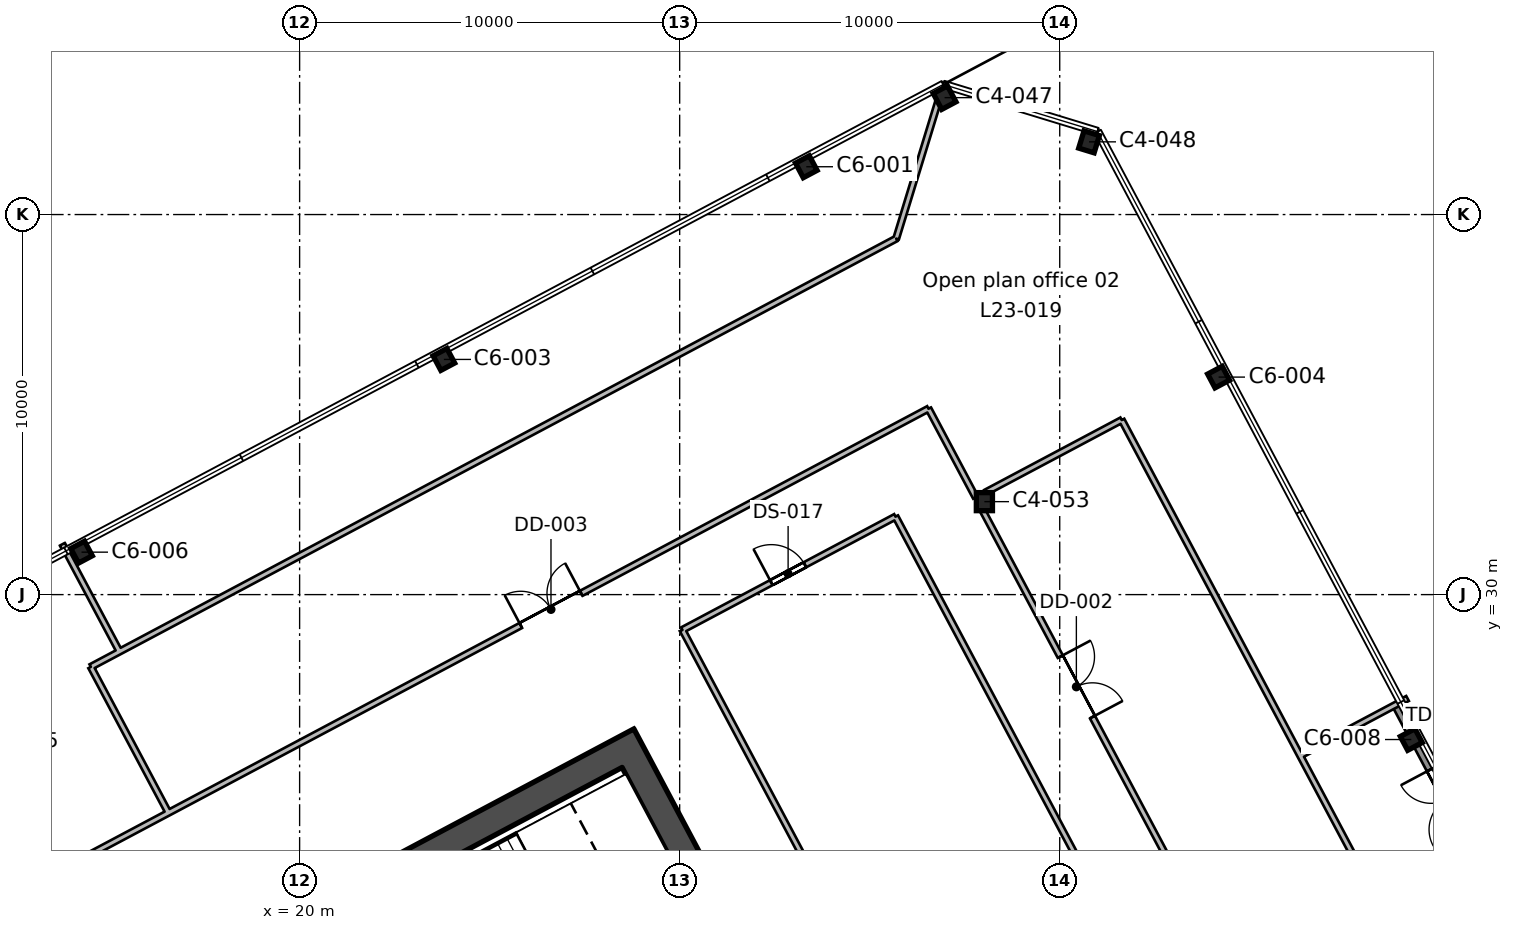
"""IFC4 building model, lengths in metres.
Left out: names, types, materials, properties, quantities, classifications, styles, units other than length and angle.
Written with IfcOpenShell. Run it as: python <this file> out.ifc"""

import sys

from ifc_helpers import new_model, si_unit, direction, frame, frame_2d, origin, origin_2d, place, context, subcontext, project, spatial, rectangle, i_section, extrude, element, fill, save


model = new_model("IFC4")
c1 = context("Model", 3, precision=1e-05, world=origin(), true_north=direction((0.0, 1.0)))
c2 = subcontext(c1, "Body", "Model", "MODEL_VIEW")
j1 = project(units=[si_unit("LENGTHUNIT", "METRE"), si_unit("PLANEANGLEUNIT", "RADIAN")], contexts=[c1])
p1 = place(None, origin())
s1 = spatial("IfcSite", under=j1, at=p1, CompositionType="ELEMENT")
p2 = place(p1, origin())
s2 = spatial("IfcBuilding", under=s1, at=p2, CompositionType="ELEMENT")
p3 = place(p2, frame((0.0, 0.0, 118.2)))
s3 = spatial("IfcBuildingStorey", under=s2, at=p3, CompositionType="ELEMENT", Elevation=118.2)
for number, where, z_axis, x_axis in (
    (1, (49.251, 26.187, 0.0), (0.0, 0.0, 1.0), (-0.469, 0.883, 0.0)),
    (2, (14.261, 31.117, 0.0), (0.0, 0.0, 1.0), (-0.883, -0.469, 0.0)),
):
    element("IfcColumn", number, at=place(p3, frame(where, z_axis=z_axis, x_axis=x_axis)), inside=s3, PredefinedType="COLUMN", context=c2, shape_type="SweptSolid", body=[
        extrude(i_section(OverallWidth=0.412, OverallDepth=0.434, WebThickness=0.036, FlangeThickness=0.057, FilletRadius=0.015, at=origin_2d()), origin(), (0.0, 0.0, 1.0), 4.0),
    ])
p4 = place(p3, frame((38.018, 32.446, 0.0), z_axis=(0.0, 0.0, 1.0), x_axis=(1.0, 0.0, 0.0)))
e3 = element("IfcColumn", 3, at=p4, inside=s3, PredefinedType="COLUMN", context=c2, shape_type="SweptSolid", body=[
    extrude(i_section(OverallWidth=0.424, OverallDepth=0.475, WebThickness=0.048, FlangeThickness=0.077, FilletRadius=0.015, at=origin_2d()), origin(), (0.0, 0.0, 1.0), 4.0),
])
for number, where, z_axis, x_axis in (
    (4, (44.181, 35.723, 0.0), (0.0, 0.0, 1.0), (-0.469, 0.883, 0.0)),
    (5, (23.796, 36.188, 0.0), (0.0, 0.0, 1.0), (-0.883, -0.469, 0.0)),
    (6, (33.332, 41.258, 0.0), (0.0, 0.0, 1.0), (-0.883, -0.469, 0.0)),
):
    element("IfcColumn", number, at=place(p3, frame(where, z_axis=z_axis, x_axis=x_axis)), inside=s3, PredefinedType="COLUMN", context=c2, shape_type="SweptSolid", body=[
        extrude(i_section(OverallWidth=0.412, OverallDepth=0.434, WebThickness=0.036, FlangeThickness=0.057, FilletRadius=0.015, at=origin_2d()), origin(), (0.0, 0.0, 1.0), 4.0),
    ])
for number, where, z_axis, x_axis in (
    (7, (40.772, 41.913, 0.0), (0.0, 0.0, 1.0), (-0.956, 0.292, 0.0)),
    (8, (36.971, 43.076, 0.0), (0.0, 0.0, 1.0), (-0.883, -0.469, 0.0)),
):
    element("IfcColumn", number, at=place(p3, frame(where, z_axis=z_axis, x_axis=x_axis)), inside=s3, PredefinedType="COLUMN", context=c2, shape_type="SweptSolid", body=[
        extrude(i_section(OverallWidth=0.424, OverallDepth=0.475, WebThickness=0.048, FlangeThickness=0.077, FilletRadius=0.015, at=origin_2d()), origin(), (0.0, 0.0, 1.0), 4.0),
    ])
p5 = place(p3, frame((37.713, 8.896, 0.0), z_axis=(0.0, 0.0, 1.0), x_axis=(-0.469469918705, 0.88294846703, 0.0)))
e9 = element("IfcWall", 9, at=p5, inside=s3, PredefinedType="SHEAR", context=c2, shape_type="SweptSolid", body=[
    extrude(rectangle(XDim=19.7, YDim=0.75, at=frame_2d((9.85, 0.0))), origin(), (0.0, 0.0, 1.0), 4.0),
])
p6 = place(p5, frame((10.45, 0.0, 0.0)))
e10 = element("IfcOpeningElement", 10, at=p6, cuts=e9, PredefinedType="OPENING", context=c2, shape_type="SweptSolid", body=[
    extrude(rectangle(XDim=2.4, YDim=2.4, at=frame_2d((1.2, 1.2))), frame((0.0, 0.385, 0.0), z_axis=(0.0, -1.0, 0.0), x_axis=(1.0, 0.0, 0.0)), (0.0, 0.0, 1.0), 0.77),
])
p7 = place(p3, frame((10.474, 16.3, 0.0), z_axis=(0.0, 0.0, 1.0), x_axis=(0.88295010195, 0.469466843842, 0.0)))
e11 = element("IfcWall", 11, at=p7, inside=s3, PredefinedType="SHEAR", context=c2, shape_type="SweptSolid", body=[
    extrude(rectangle(XDim=20.2, YDim=0.75, at=frame_2d((10.1, 0.0))), origin(), (0.0, 0.0, 1.0), 4.0),
])
p8 = place(p3, frame((51.525, 22.111, 0.0), z_axis=(0.0, 0.0, 1.0), x_axis=(-0.469442908777, 0.88296282787, 0.0)))
e12 = element("IfcWall", 12, at=p8, inside=s3, PredefinedType="STANDARD", context=c2, shape_type="SweptSolid", body=[
    extrude(rectangle(XDim=5.667, YDim=0.25, at=frame_2d((2.833, 0.0))), origin(), (0.0, 0.0, 1.0), 2.619),
])
p9 = place(p8, frame((1.933, 0.0, 0.0)))
e13 = element("IfcOpeningElement", 13, at=p9, cuts=e12, PredefinedType="OPENING", context=c2, shape_type="SweptSolid", body=[
    extrude(rectangle(XDim=1.8, YDim=2.4, at=frame_2d((0.9, 1.2))), frame((0.0, 0.135, 0.0), z_axis=(0.0, -1.0, 0.0), x_axis=(1.0, 0.0, 0.0)), (0.0, 0.0, 1.0), 0.27),
])
p10 = place(p3, frame((0.0, 15.46, 0.0), z_axis=(0.0, 0.0, 1.0), x_axis=(0.882952116052, 0.469463055798, 0.0)))
e14 = element("IfcWall", 14, at=p10, inside=s3, PredefinedType="PARTITIONING", context=c2, shape_type="SweptSolid", body=[
    extrude(rectangle(XDim=18.96, YDim=0.15, at=frame_2d((9.48, 0.0))), origin(), (0.0, 0.0, 1.0), 3.64),
])
p11 = place(p10, frame((9.35, 0.0, 0.0)))
e15 = element("IfcOpeningElement", 15, at=p11, cuts=e14, PredefinedType="OPENING", context=c2, shape_type="SweptSolid", body=[
    extrude(rectangle(XDim=1.0, YDim=2.1, at=frame_2d((0.5, 1.05))), frame((0.0, 0.085, 0.0), z_axis=(0.0, -1.0, 0.0), x_axis=(1.0, 0.0, 0.0)), (0.0, 0.0, 1.0), 0.17),
])
p12 = place(p10, frame((7.7, 0.0, 0.0)))
e16 = element("IfcOpeningElement", 16, at=p12, cuts=e14, PredefinedType="OPENING", context=c2, shape_type="SweptSolid", body=[
    extrude(rectangle(XDim=1.0, YDim=2.1, at=frame_2d((0.5, 1.05))), frame((0.0, 0.085, 0.0), z_axis=(0.0, -1.0, 0.0), x_axis=(1.0, 0.0, 0.0)), (0.0, 0.0, 1.0), 0.17),
])
p13 = place(p3, frame((15.761, 25.739, 0.0), z_axis=(0.0, 0.0, 1.0), x_axis=(0.469318416257, -0.883029005278, 0.0)))
e17 = element("IfcWall", 17, at=p13, inside=s3, PredefinedType="PARTITIONING", context=c2, shape_type="SweptSolid", body=[
    extrude(rectangle(XDim=1.677, YDim=0.15, at=frame_2d((0.839, 0.0))), origin(), (0.0, 0.0, 1.0), 3.64),
])
p14 = place(p3, frame((13.757, 31.325, 0.0), z_axis=(0.0, 0.0, 1.0), x_axis=(0.469685095616, -0.882834022315, 0.0)))
e18 = element("IfcWall", 18, at=p14, inside=s3, PredefinedType="PARTITIONING", context=c2, shape_type="SweptSolid", body=[
    extrude(rectangle(XDim=3.2, YDim=0.15, at=frame_2d((1.6, 0.0))), origin(), (0.0, 0.0, 1.0), 3.64),
])
p15 = place(p3, frame((15.258, 28.499, 0.0), z_axis=(0.0, 0.0, 1.0), x_axis=(0.882941691772, 0.469482660948, 0.0)))
e19 = element("IfcWall", 19, at=p15, inside=s3, PredefinedType="PARTITIONING", context=c2, shape_type="SweptSolid", body=[
    extrude(rectangle(XDim=23.149, YDim=0.15, at=frame_2d((11.574, 0.0))), origin(), (0.0, 0.0, 1.0), 3.64),
])
p16 = place(p3, frame((35.697, 39.367, 0.0), z_axis=(0.0, 0.0, 1.0), x_axis=(0.292517637823, 0.956260127561, 0.0)))
e20 = element("IfcWall", 20, at=p16, inside=s3, PredefinedType="PARTITIONING", context=c2, shape_type="SweptSolid", body=[
    extrude(rectangle(XDim=3.753, YDim=0.15, at=frame_2d((1.876, 0.0))), origin(), (0.0, 0.0, 1.0), 3.64),
])
p17 = place(p3, frame((15.761, 25.739, 0.0), z_axis=(0.0, 0.0, 1.0), x_axis=(-0.469469065188, 0.882948920851, 0.0)))
e21 = element("IfcWall", 21, at=p17, inside=s3, PredefinedType="PARTITIONING", context=c2, shape_type="SweptSolid", body=[
    extrude(rectangle(XDim=2.673, YDim=0.15, at=frame_2d((1.336, 0.0))), origin(), (0.0, 0.0, 1.0), 3.64),
])
p18 = place(p3, frame((14.506, 28.099, 0.0), z_axis=(0.0, 0.0, 1.0), x_axis=(0.882907789101, 0.469546415113, 0.0)))
e22 = element("IfcWall", 22, at=p18, inside=s3, PredefinedType="PARTITIONING", context=c2, shape_type="SweptSolid", body=[
    extrude(rectangle(XDim=0.852, YDim=0.15, at=frame_2d((0.426, 0.0))), origin(), (0.0, 0.0, 1.0), 3.64),
])
p19 = place(p3, frame((37.789, 32.557, 0.0), z_axis=(0.0, 0.0, 1.0), x_axis=(-0.469557862383, 0.882901701139, 0.0)))
e23 = element("IfcWall", 23, at=p19, inside=s3, PredefinedType="PARTITIONING", context=c2, shape_type="SweptSolid", body=[
    extrude(rectangle(XDim=2.645, YDim=0.15, at=frame_2d((1.323, 0.0))), origin(), (0.0, 0.0, 1.0), 3.64),
])
p20 = place(p3, frame((36.547, 34.892, 0.0), z_axis=(0.0, 0.0, 1.0), x_axis=(-0.882949665217, -0.469467665226, 0.0)))
e24 = element("IfcWall", 24, at=p20, inside=s3, PredefinedType="PARTITIONING", context=c2, shape_type="SweptSolid", body=[
    extrude(rectangle(XDim=22.432, YDim=0.15, at=frame_2d((11.216, 0.0))), origin(), (0.0, 0.0, 1.0), 3.64),
])
p21 = place(p20, frame((10.35, 0.0, 0.0)))
e25 = element("IfcOpeningElement", 25, at=p21, cuts=e24, PredefinedType="OPENING", context=c2, shape_type="SweptSolid", body=[
    extrude(rectangle(XDim=1.8, YDim=2.1, at=frame_2d((0.9, 1.05))), frame((0.0, 0.085, 0.0), z_axis=(0.0, -1.0, 0.0), x_axis=(1.0, 0.0, 0.0)), (0.0, 0.0, 1.0), 0.17),
])
p22 = place(p3, frame((46.081, 26.226, 0.0), z_axis=(0.0, 0.0, 1.0), x_axis=(-0.469444635522, 0.882961909812, 0.0)))
e26 = element("IfcWall", 26, at=p22, inside=s3, PredefinedType="PARTITIONING", context=c2, shape_type="SweptSolid", body=[
    extrude(rectangle(XDim=9.477, YDim=0.15, at=frame_2d((4.739, 0.0))), origin(), (0.0, 0.0, 1.0), 3.64),
])
p23 = place(p3, frame((41.632, 34.594, 0.0), z_axis=(0.0, 0.0, 1.0), x_axis=(-0.88295491585, -0.469457789984, 0.0)))
e27 = element("IfcWall", 27, at=p23, inside=s3, PredefinedType="PARTITIONING", context=c2, shape_type="SweptSolid", body=[
    extrude(rectangle(XDim=4.07, YDim=0.15, at=frame_2d((2.035, 0.0))), origin(), (0.0, 0.0, 1.0), 3.64),
])
p24 = place(p3, frame((37.973, 32.209, 0.0), z_axis=(0.0, 0.0, 1.0), x_axis=(0.469526119231, -0.88291858252, 0.0)))
e28 = element("IfcWall", 28, at=p24, inside=s3, PredefinedType="PARTITIONING", context=c2, shape_type="SweptSolid", body=[
    extrude(rectangle(XDim=10.443, YDim=0.15, at=frame_2d((5.221, 0.0))), origin(), (0.0, 0.0, 1.0), 3.64),
])
p25 = place(p24, frame((4.35, 0.0, 0.0)))
e29 = element("IfcOpeningElement", 29, at=p25, cuts=e28, PredefinedType="OPENING", context=c2, shape_type="SweptSolid", body=[
    extrude(rectangle(XDim=1.8, YDim=2.1, at=frame_2d((0.9, 1.05))), frame((0.0, 0.085, 0.0), z_axis=(0.0, -1.0, 0.0), x_axis=(1.0, 0.0, 0.0)), (0.0, 0.0, 1.0), 0.17),
])
p26 = place(p3, frame((46.081, 26.226, 0.0), z_axis=(0.0, 0.0, 1.0), x_axis=(0.469497962096, -0.88293355559, 0.0)))
e30 = element("IfcWall", 30, at=p26, inside=s3, PredefinedType="PARTITIONING", context=c2, shape_type="SweptSolid", body=[
    extrude(rectangle(XDim=20.032, YDim=0.15, at=frame_2d((10.016, 0.0))), origin(), (0.0, 0.0, 1.0), 3.64),
])
p27 = place(p3, frame((49.152, 27.268, 0.0), z_axis=(0.0, 0.0, 1.0), x_axis=(-0.882819217955, -0.469712921271, 0.0)))
e31 = element("IfcWall", 31, at=p27, inside=s3, PredefinedType="PARTITIONING", context=c2, shape_type="SweptSolid", body=[
    extrude(rectangle(XDim=3.2, YDim=0.15, at=frame_2d((1.6, 0.0))), origin(), (0.0, 0.0, 1.0), 3.64),
])
p28 = place(p3, frame((30.072, 29.071, 0.0), z_axis=(0.0, 0.0, 1.0), x_axis=(0.882967334814, 0.469434431685, 0.0)))
e32 = element("IfcWall", 32, at=p28, inside=s3, PredefinedType="PARTITIONING", context=c2, shape_type="SweptSolid", body=[
    extrude(rectangle(XDim=6.35, YDim=0.15, at=frame_2d((3.175, 0.0))), origin(), (0.0, 0.0, 1.0), 3.64),
])
p29 = place(p28, frame((2.65, 0.0, 0.0)))
e33 = element("IfcOpeningElement", 33, at=p29, cuts=e32, PredefinedType="OPENING", context=c2, shape_type="SweptSolid", body=[
    extrude(rectangle(XDim=1.0, YDim=2.1, at=frame_2d((0.5, 1.05))), frame((0.0, 0.085, 0.0), z_axis=(0.0, -1.0, 0.0), x_axis=(1.0, 0.0, 0.0)), (0.0, 0.0, 1.0), 0.17),
])
p30 = place(p3, frame((35.679, 32.052, 0.0), z_axis=(0.0, 0.0, 1.0), x_axis=(0.469483439962, -0.88294127755, 0.0)))
e34 = element("IfcWall", 34, at=p30, inside=s3, PredefinedType="PARTITIONING", context=c2, shape_type="SweptSolid", body=[
    extrude(rectangle(XDim=21.1, YDim=0.15, at=frame_2d((10.55, 0.0))), origin(), (0.0, 0.0, 1.0), 3.64),
])
p31 = place(p3, frame((39.978, 10.441, 0.0), z_axis=(0.0, 0.0, 1.0), x_axis=(-0.469478643621, 0.882943827876, 0.0)))
e35 = element("IfcWall", 35, at=p31, inside=s3, PredefinedType="PARTITIONING", context=c2, shape_type="SweptSolid", body=[
    extrude(rectangle(XDim=21.1, YDim=0.15, at=frame_2d((10.55, 0.0))), origin(), (0.0, 0.0, 1.0), 3.64),
])
p32 = place(p9, origin())
e36 = element("IfcDoor", 36, at=p32, inside=s3, OperationType="DOUBLE_DOOR_SINGLE_SWING", PredefinedType="DOOR", context=c2, shape_type="SweptSolid", body=[
    extrude(rectangle(XDim=1.8, YDim=2.4, at=frame_2d((0.9, 1.2))), frame((0.0, 0.025, 0.0), z_axis=(0.0, -1.0, 0.0), x_axis=(1.0, 0.0, 0.0)), (0.0, 0.0, 1.0), 0.05),
])
fill(e13, e36)
p33 = place(p25, origin())
e37 = element("IfcDoor", 37, at=p33, inside=s3, OperationType="DOUBLE_DOOR_SINGLE_SWING", PredefinedType="DOOR", context=c2, shape_type="SweptSolid", body=[
    extrude(rectangle(XDim=1.8, YDim=2.1, at=frame_2d((0.9, 1.05))), frame((0.0, 0.025, 0.0), z_axis=(0.0, -1.0, 0.0), x_axis=(1.0, 0.0, 0.0)), (0.0, 0.0, 1.0), 0.05),
])
fill(e29, e37)
p34 = place(p21, frame((1.8, 0.0, 0.0), z_axis=(0.0, 0.0, 1.0), x_axis=(-1.0, 0.0, 0.0)))
e38 = element("IfcDoor", 38, at=p34, inside=s3, OperationType="DOUBLE_DOOR_SINGLE_SWING", PredefinedType="DOOR", context=c2, shape_type="SweptSolid", body=[
    extrude(rectangle(XDim=1.8, YDim=2.1, at=frame_2d((0.9, 1.05))), frame((0.0, 0.025, 0.0), z_axis=(0.0, -1.0, 0.0), x_axis=(1.0, 0.0, 0.0)), (0.0, 0.0, 1.0), 0.05),
])
fill(e25, e38)
p35 = place(p29, origin())
e39 = element("IfcDoor", 39, at=p35, inside=s3, OperationType="SINGLE_SWING_LEFT", PredefinedType="DOOR", context=c2, shape_type="SweptSolid", body=[
    extrude(rectangle(XDim=1.0, YDim=2.1, at=frame_2d((0.5, 1.05))), frame((0.0, 0.025, 0.0), z_axis=(0.0, -1.0, 0.0), x_axis=(1.0, 0.0, 0.0)), (0.0, 0.0, 1.0), 0.05),
])
fill(e33, e39)
save(model, sys.argv[1])
